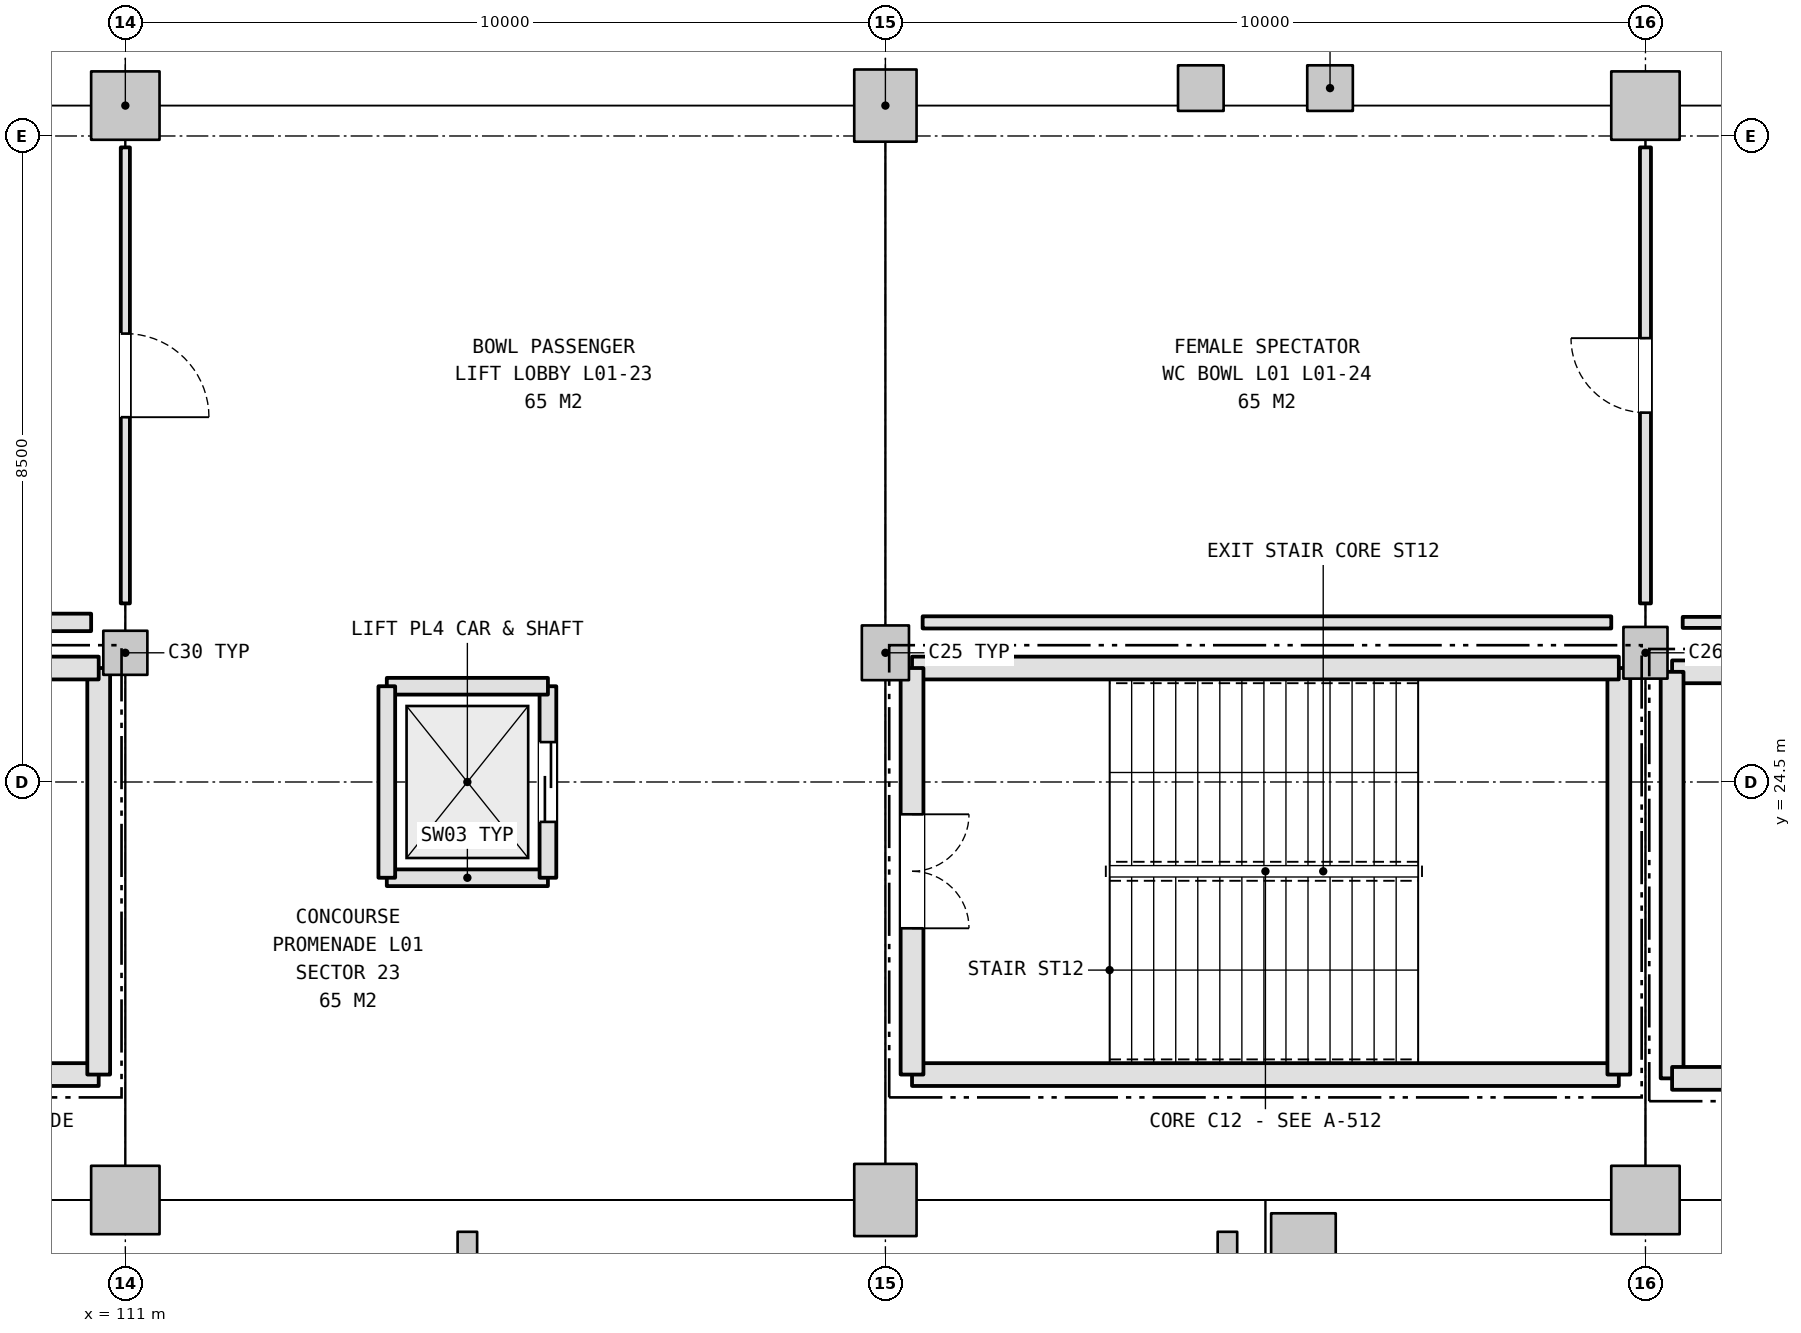
"""IFC4 building model, lengths in metres.
Left out: names, types, materials, properties, quantities, classifications, styles, units other than length and angle.
Written with IfcOpenShell. Run it as: python <this file> out.ifc"""

import sys

from ifc_helpers import new_model, si_unit, direction, frame, frame_2d, origin, origin_2d, place, context, subcontext, project, spatial, rectangle, i_section, extrude, element, fill, save


model = new_model("IFC4")
c1 = context("Model", 3, precision=1e-05, world=origin(), true_north=direction((0.0, 1.0)))
c2 = subcontext(c1, "Body", "Model", "MODEL_VIEW")
j1 = project(units=[si_unit("LENGTHUNIT", "METRE"), si_unit("PLANEANGLEUNIT", "RADIAN")], contexts=[c1])
p1 = place(None, origin())
s1 = spatial("IfcSite", under=j1, at=p1, CompositionType="ELEMENT")
p2 = place(p1, origin())
s2 = spatial("IfcBuilding", under=s1, at=p2, CompositionType="ELEMENT")
p3 = place(p2, frame((0.0, 0.0, 5.4)))
s3 = spatial("IfcBuildingStorey", under=s2, at=p3, CompositionType="ELEMENT", Elevation=5.4)
p4 = place(p3, frame((111.0, 33.4, 0.0), z_axis=(0.0, 0.0, 1.0), x_axis=(1.0, 0.0, 0.0)))
e1 = element("IfcColumn", 1, at=p4, inside=s3, PredefinedType="COLUMN", context=c2, shape_type="SweptSolid", body=[
    extrude(rectangle(XDim=0.9, YDim=0.9, at=origin_2d()), origin(), (0.0, 0.0, 1.0), 5.4),
])
p5 = place(p3, frame((111.0, 26.2, 0.0), z_axis=(0.0, 0.0, 1.0), x_axis=(1.0, 0.0, 0.0)))
e2 = element("IfcColumn", 2, at=p5, inside=s3, PredefinedType="COLUMN", context=c2, shape_type="SweptSolid", body=[
    extrude(rectangle(XDim=0.58, YDim=0.58, at=origin_2d()), origin(), (0.0, 0.0, 1.0), 5.4),
])
p6 = place(p3, frame((111.0, 19.0, 0.0), z_axis=(0.0, 0.0, 1.0), x_axis=(1.0, 0.0, 0.0)))
e3 = element("IfcColumn", 3, at=p6, inside=s3, PredefinedType="COLUMN", context=c2, shape_type="SweptSolid", body=[
    extrude(rectangle(XDim=0.9, YDim=0.9, at=origin_2d()), origin(), (0.0, 0.0, 1.0), 5.4),
])
p7 = place(p3, frame((121.0, 33.4, 0.0), z_axis=(0.0, 0.0, 1.0), x_axis=(1.0, 0.0, 0.0)))
e4 = element("IfcColumn", 4, at=p7, inside=s3, PredefinedType="COLUMN", context=c2, shape_type="SweptSolid", body=[
    extrude(rectangle(XDim=0.82, YDim=0.95, at=origin_2d()), origin(), (0.0, 0.0, 1.0), 5.4),
])
p8 = place(p3, frame((121.0, 26.2, 0.0), z_axis=(0.0, 0.0, 1.0), x_axis=(1.0, 0.0, 0.0)))
e5 = element("IfcColumn", 5, at=p8, inside=s3, PredefinedType="COLUMN", context=c2, shape_type="SweptSolid", body=[
    extrude(rectangle(XDim=0.62, YDim=0.72, at=origin_2d()), origin(), (0.0, 0.0, 1.0), 5.4),
])
p9 = place(p3, frame((121.0, 19.0, 0.0), z_axis=(0.0, 0.0, 1.0), x_axis=(1.0, 0.0, 0.0)))
e6 = element("IfcColumn", 6, at=p9, inside=s3, PredefinedType="COLUMN", context=c2, shape_type="SweptSolid", body=[
    extrude(rectangle(XDim=0.82, YDim=0.95, at=origin_2d()), origin(), (0.0, 0.0, 1.0), 5.4),
])
p10 = place(p3, frame((131.0, 33.4, 0.0), z_axis=(0.0, 0.0, 1.0), x_axis=(1.0, 0.0, 0.0)))
e7 = element("IfcColumn", 7, at=p10, inside=s3, PredefinedType="COLUMN", context=c2, shape_type="SweptSolid", body=[
    extrude(rectangle(XDim=0.9, YDim=0.9, at=origin_2d()), origin(), (0.0, 0.0, 1.0), 5.4),
])
p11 = place(p3, frame((131.0, 26.2, 0.0), z_axis=(0.0, 0.0, 1.0), x_axis=(1.0, 0.0, 0.0)))
e8 = element("IfcColumn", 8, at=p11, inside=s3, PredefinedType="COLUMN", context=c2, shape_type="SweptSolid", body=[
    extrude(rectangle(XDim=0.58, YDim=0.68, at=origin_2d()), origin(), (0.0, 0.0, 1.0), 5.4),
])
p12 = place(p3, frame((131.0, 19.0, 0.0), z_axis=(0.0, 0.0, 1.0), x_axis=(1.0, 0.0, 0.0)))
e9 = element("IfcColumn", 9, at=p12, inside=s3, PredefinedType="COLUMN", context=c2, shape_type="SweptSolid", body=[
    extrude(rectangle(XDim=0.9, YDim=0.9, at=origin_2d()), origin(), (0.0, 0.0, 1.0), 5.4),
])
p13 = place(p3, frame((126.5, 18.4, 0.0), z_axis=(0.0, 0.0, 1.0), x_axis=(1.0, 0.0, 0.0)))
e10 = element("IfcColumn", 10, at=p13, inside=s3, PredefinedType="COLUMN", context=c2, shape_type="SweptSolid", body=[
    extrude(rectangle(XDim=0.85, YDim=0.85, at=origin_2d()), origin(), (0.0, 0.0, 1.0), 5.4),
])
for number, where, z_axis, x_axis in (
    (11, (115.5, 18.4, 0.0), (0.0, 0.0, 1.0), (1.0, 0.0, 0.0)),
    (12, (125.5, 18.4, 0.0), (0.0, 0.0, 1.0), (1.0, 0.0, 0.0)),
):
    element("IfcColumn", number, at=place(p3, frame(where, z_axis=z_axis, x_axis=x_axis)), inside=s3, PredefinedType="COLUMN", context=c2, shape_type="SweptSolid", body=[
        extrude(i_section(OverallWidth=0.257, OverallDepth=0.363, WebThickness=0.013, FlangeThickness=0.022, FilletRadius=0.015, at=origin_2d()), origin(), (0.0, 0.0, 1.0), 5.4),
    ])
p14 = place(p3, frame((140.65, 25.95, 0.0), z_axis=(0.0, 0.0, 1.0), x_axis=(-1.0, 0.0, 0.0)))
e13 = element("IfcWall", 13, at=p14, inside=s3, PredefinedType="SHEAR", context=c2, shape_type="SweptSolid", body=[
    extrude(rectangle(XDim=9.299, YDim=0.3, at=frame_2d((4.65, 0.0))), origin(), (0.0, 0.0, 1.0), 5.14),
])
p15 = place(p3, frame((131.35, 25.95, 0.0), z_axis=(0.0, 0.0, 1.0), x_axis=(0.0, -1.0, 0.0)))
e14 = element("IfcWall", 14, at=p15, inside=s3, PredefinedType="SHEAR", context=c2, shape_type="SweptSolid", body=[
    extrude(rectangle(XDim=5.349, YDim=0.3, at=frame_2d((2.675, 0.0))), origin(), (0.0, 0.0, 1.0), 5.14),
])
for number, where, z_axis, x_axis in (
    (15, (131.35, 20.6, 0.0), (0.0, 0.0, 1.0), (1.0, 0.0, 0.0)),
    (16, (121.35, 20.65, 0.0), (0.0, 0.0, 1.0), (1.0, 0.0, 0.0)),
):
    element("IfcWall", number, at=place(p3, frame(where, z_axis=z_axis, x_axis=x_axis)), inside=s3, PredefinedType="SHEAR", context=c2, shape_type="SweptSolid", body=[
        extrude(rectangle(XDim=9.299, YDim=0.3, at=frame_2d((4.65, 0.0))), origin(), (0.0, 0.0, 1.0), 5.14),
    ])
p16 = place(p3, frame((130.65, 20.65, 0.0), z_axis=(0.0, 0.0, 1.0), x_axis=(0.0, 1.0, 0.0)))
e17 = element("IfcWall", 17, at=p16, inside=s3, PredefinedType="SHEAR", context=c2, shape_type="SweptSolid", body=[
    extrude(rectangle(XDim=5.349, YDim=0.3, at=frame_2d((2.675, 0.0))), origin(), (0.0, 0.0, 1.0), 5.14),
])
p17 = place(p3, frame((130.65, 26.0, 0.0), z_axis=(0.0, 0.0, 1.0), x_axis=(-1.0, 0.0, 0.0)))
e18 = element("IfcWall", 18, at=p17, inside=s3, PredefinedType="SHEAR", context=c2, shape_type="SweptSolid", body=[
    extrude(rectangle(XDim=9.299, YDim=0.3, at=frame_2d((4.65, 0.0))), origin(), (0.0, 0.0, 1.0), 5.14),
])
p18 = place(p3, frame((121.35, 26.0, 0.0), z_axis=(0.0, 0.0, 1.0), x_axis=(0.0, -1.0, 0.0)))
e19 = element("IfcWall", 19, at=p18, inside=s3, PredefinedType="SHEAR", context=c2, shape_type="SweptSolid", body=[
    extrude(rectangle(XDim=5.349, YDim=0.3, at=frame_2d((2.675, 0.0))), origin(), (0.0, 0.0, 1.0), 5.14),
])
p19 = place(p18, frame((1.925, 0.0, 0.0)))
e20 = element("IfcOpeningElement", 20, at=p19, cuts=e19, PredefinedType="OPENING", context=c2, shape_type="SweptSolid", body=[
    extrude(rectangle(XDim=1.5, YDim=2.2, at=frame_2d((0.75, 1.1))), frame((0.0, 0.16, 0.0), z_axis=(0.0, -1.0, 0.0), x_axis=(1.0, 0.0, 0.0)), (0.0, 0.0, 1.0), 0.32),
])
p20 = place(p3, frame((101.35, 20.65, 0.0), z_axis=(0.0, 0.0, 1.0), x_axis=(1.0, 0.0, 0.0)))
e21 = element("IfcWall", 21, at=p20, inside=s3, PredefinedType="SHEAR", context=c2, shape_type="SweptSolid", body=[
    extrude(rectangle(XDim=9.299, YDim=0.3, at=frame_2d((4.65, 0.0))), origin(), (0.0, 0.0, 1.0), 5.14),
])
p21 = place(p3, frame((110.65, 20.65, 0.0), z_axis=(0.0, 0.0, 1.0), x_axis=(0.0, 1.0, 0.0)))
e22 = element("IfcWall", 22, at=p21, inside=s3, PredefinedType="SHEAR", context=c2, shape_type="SweptSolid", body=[
    extrude(rectangle(XDim=5.349, YDim=0.3, at=frame_2d((2.675, 0.0))), origin(), (0.0, 0.0, 1.0), 5.14),
])
p22 = place(p3, frame((110.65, 26.0, 0.0), z_axis=(0.0, 0.0, 1.0), x_axis=(-1.0, 0.0, 0.0)))
e23 = element("IfcWall", 23, at=p22, inside=s3, PredefinedType="SHEAR", context=c2, shape_type="SweptSolid", body=[
    extrude(rectangle(XDim=9.299, YDim=0.3, at=frame_2d((4.65, 0.0))), origin(), (0.0, 0.0, 1.0), 5.14),
])
for number, where, z_axis, x_axis in (
    (24, (126.85, 33.63, 0.0), (0.0, 0.0, 1.0), (1.0, 0.0, 0.0)),
    (25, (125.15, 33.63, 0.0), (0.0, 0.0, 1.0), (1.0, 0.0, 0.0)),
):
    element("IfcColumn", number, at=place(p3, frame(where, z_axis=z_axis, x_axis=x_axis)), inside=s3, PredefinedType="COLUMN", context=c2, shape_type="SweptSolid", body=[
        extrude(rectangle(XDim=0.6, YDim=0.6, at=origin_2d()), origin(), (0.0, 0.0, 1.0), 5.4),
    ])
p23 = place(p3, frame((114.44, 23.24, 0.0), z_axis=(0.0, 0.0, 1.0), x_axis=(1.0, 0.0, 0.0)))
e26 = element("IfcWall", 26, at=p23, inside=s3, PredefinedType="SHEAR", context=c2, shape_type="SweptSolid", body=[
    extrude(rectangle(XDim=2.12, YDim=0.22, at=frame_2d((1.06, 0.0))), origin(), (0.0, 0.0, 1.0), 5.14),
])
p24 = place(p3, frame((116.56, 23.24, 0.0), z_axis=(0.0, 0.0, 1.0), x_axis=(0.0, 1.0, 0.0)))
e27 = element("IfcWall", 27, at=p24, inside=s3, PredefinedType="SHEAR", context=c2, shape_type="SweptSolid", body=[
    extrude(rectangle(XDim=2.52, YDim=0.22, at=frame_2d((1.26, 0.0))), origin(), (0.0, 0.0, 1.0), 5.14),
])
p25 = place(p24, frame((0.735, 0.0, 0.0)))
e28 = element("IfcOpeningElement", 28, at=p25, cuts=e27, PredefinedType="OPENING", context=c2, shape_type="SweptSolid", body=[
    extrude(rectangle(XDim=1.05, YDim=2.15, at=frame_2d((0.525, 1.075))), frame((0.0, 0.12, 0.0), z_axis=(0.0, -1.0, 0.0), x_axis=(1.0, 0.0, 0.0)), (0.0, 0.0, 1.0), 0.24),
])
p26 = place(p3, frame((116.56, 25.76, 0.0), z_axis=(0.0, 0.0, 1.0), x_axis=(-1.0, 0.0, 0.0)))
e29 = element("IfcWall", 29, at=p26, inside=s3, PredefinedType="SHEAR", context=c2, shape_type="SweptSolid", body=[
    extrude(rectangle(XDim=2.12, YDim=0.22, at=frame_2d((1.06, 0.0))), origin(), (0.0, 0.0, 1.0), 5.14),
])
p27 = place(p3, frame((114.44, 25.76, 0.0), z_axis=(0.0, 0.0, 1.0), x_axis=(0.0, -1.0, 0.0)))
e30 = element("IfcWall", 30, at=p27, inside=s3, PredefinedType="SHEAR", context=c2, shape_type="SweptSolid", body=[
    extrude(rectangle(XDim=2.52, YDim=0.22, at=frame_2d((1.26, 0.0))), origin(), (0.0, 0.0, 1.0), 5.14),
])
p28 = place(p3, frame((111.0, 32.85, 0.0), z_axis=(0.0, 0.0, 1.0), x_axis=(0.0, -1.0, 0.0)))
e31 = element("IfcWall", 31, at=p28, inside=s3, PredefinedType="PARTITIONING", context=c2, shape_type="SweptSolid", body=[
    extrude(rectangle(XDim=6.0, YDim=0.12, at=frame_2d((3.0, 0.0))), origin(), (0.0, 0.0, 1.0), 4.375),
])
p29 = place(p28, frame((2.45, 0.0, 0.0)))
e32 = element("IfcOpeningElement", 32, at=p29, cuts=e31, PredefinedType="OPENING", context=c2, shape_type="SweptSolid", body=[
    extrude(rectangle(XDim=1.1, YDim=2.15, at=frame_2d((0.55, 1.075))), frame((0.0, 0.07, 0.0), z_axis=(0.0, -1.0, 0.0), x_axis=(1.0, 0.0, 0.0)), (0.0, 0.0, 1.0), 0.14),
])
p30 = place(p3, frame((110.55, 26.6, 0.0), z_axis=(0.0, 0.0, 1.0), x_axis=(-1.0, 0.0, 0.0)))
e33 = element("IfcWall", 33, at=p30, inside=s3, PredefinedType="PLUMBINGWALL", context=c2, shape_type="SweptSolid", body=[
    extrude(rectangle(XDim=9.06, YDim=0.23, at=frame_2d((4.53, 0.0))), origin(), (0.0, 0.0, 1.0), 5.12),
])
p31 = place(p3, frame((131.0, 32.85, 0.0), z_axis=(0.0, 0.0, 1.0), x_axis=(0.0, -1.0, 0.0)))
e34 = element("IfcWall", 34, at=p31, inside=s3, PredefinedType="PARTITIONING", context=c2, shape_type="SweptSolid", body=[
    extrude(rectangle(XDim=6.0, YDim=0.145, at=frame_2d((3.0, 0.0))), origin(), (0.0, 0.0, 1.0), 4.385),
])
p32 = place(p31, frame((2.51, 0.0, 0.0)))
e35 = element("IfcOpeningElement", 35, at=p32, cuts=e34, PredefinedType="OPENING", context=c2, shape_type="SweptSolid", body=[
    extrude(rectangle(XDim=0.98, YDim=2.15, at=frame_2d((0.49, 1.075))), frame((0.0, 0.083, 0.0), z_axis=(0.0, -1.0, 0.0), x_axis=(1.0, 0.0, 0.0)), (0.0, 0.0, 1.0), 0.165),
])
p33 = place(p3, frame((130.55, 26.6, 0.0), z_axis=(0.0, 0.0, 1.0), x_axis=(-1.0, 0.0, 0.0)))
e36 = element("IfcWall", 36, at=p33, inside=s3, PredefinedType="PARTITIONING", context=c2, shape_type="SweptSolid", body=[
    extrude(rectangle(XDim=9.06, YDim=0.16, at=frame_2d((4.53, 0.0))), origin(), (0.0, 0.0, 1.0), 5.12),
])
p34 = place(p3, frame((140.55, 26.6, 0.0), z_axis=(0.0, 0.0, 1.0), x_axis=(-1.0, 0.0, 0.0)))
e37 = element("IfcWall", 37, at=p34, inside=s3, PredefinedType="PARTITIONING", context=c2, shape_type="SweptSolid", body=[
    extrude(rectangle(XDim=9.06, YDim=0.145, at=frame_2d((4.53, 0.0))), origin(), (0.0, 0.0, 1.0), 5.12),
])
p35 = place(p19, origin())
e38 = element("IfcDoor", 38, at=p35, inside=s3, OperationType="DOUBLE_DOOR_SINGLE_SWING", PredefinedType="DOOR", context=c2, shape_type="SweptSolid", body=[
    extrude(rectangle(XDim=1.5, YDim=2.2, at=frame_2d((0.75, 1.1))), frame((0.0, 0.025, 0.0), z_axis=(0.0, -1.0, 0.0), x_axis=(1.0, 0.0, 0.0)), (0.0, 0.0, 1.0), 0.05),
])
fill(e20, e38)
p36 = place(p25, origin())
e39 = element("IfcDoor", 39, at=p36, inside=s3, OperationType="DOUBLE_DOOR_SLIDING", PredefinedType="DOOR", context=c2, shape_type="SweptSolid", body=[
    extrude(rectangle(XDim=1.05, YDim=2.15, at=frame_2d((0.525, 1.075))), frame((0.0, 0.025, 0.0), z_axis=(0.0, -1.0, 0.0), x_axis=(1.0, 0.0, 0.0)), (0.0, 0.0, 1.0), 0.05),
])
fill(e28, e39)
p37 = place(p29, origin())
e40 = element("IfcDoor", 40, at=p37, inside=s3, OperationType="SINGLE_SWING_RIGHT", PredefinedType="DOOR", context=c2, shape_type="SweptSolid", body=[
    extrude(rectangle(XDim=1.1, YDim=2.15, at=frame_2d((0.55, 1.075))), frame((0.0, 0.025, 0.0), z_axis=(0.0, -1.0, 0.0), x_axis=(1.0, 0.0, 0.0)), (0.0, 0.0, 1.0), 0.05),
])
fill(e32, e40)
p38 = place(p32, frame((0.98, 0.0, 0.0), z_axis=(0.0, 0.0, 1.0), x_axis=(-1.0, 0.0, 0.0)))
e41 = element("IfcDoor", 41, at=p38, inside=s3, OperationType="SINGLE_SWING_LEFT", PredefinedType="DOOR", context=c2, shape_type="SweptSolid", body=[
    extrude(rectangle(XDim=0.98, YDim=2.15, at=frame_2d((0.49, 1.075))), frame((0.0, 0.025, 0.0), z_axis=(0.0, -1.0, 0.0), x_axis=(1.0, 0.0, 0.0)), (0.0, 0.0, 1.0), 0.05),
])
fill(e35, e41)
save(model, sys.argv[1])
